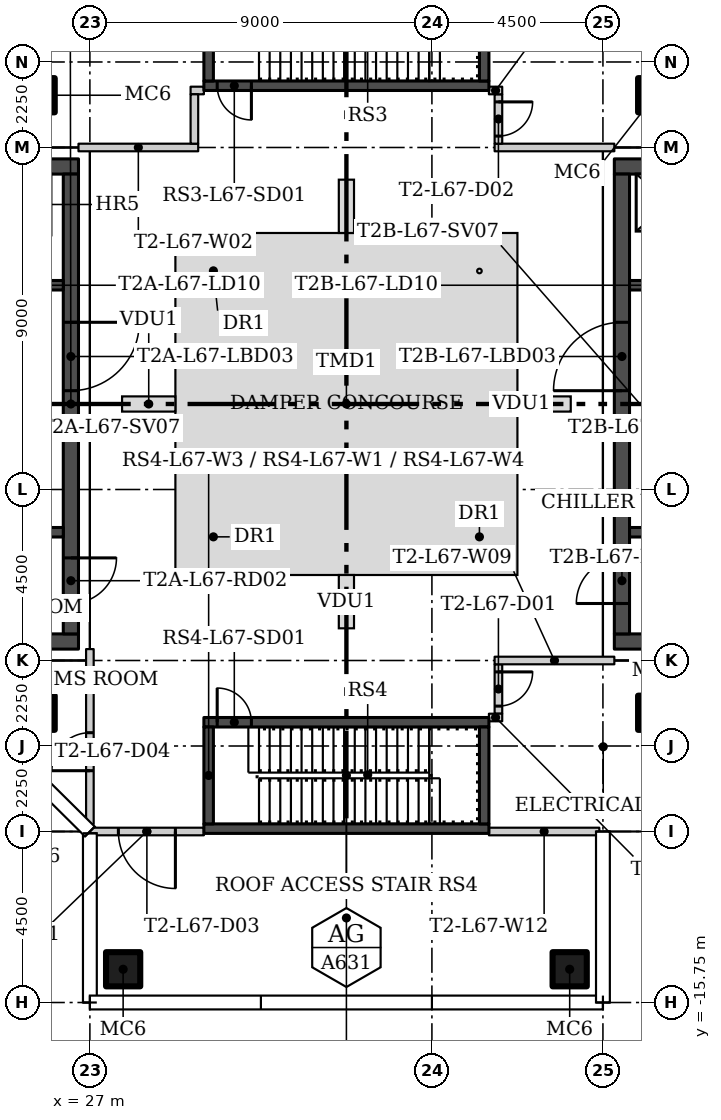
"""IFC4 building model, lengths in metres.
Left out: names, types, materials, properties, quantities, classifications, styles, units other than length and angle.
Written with IfcOpenShell. Run it as: python <this file> out.ifc"""

import sys

from ifc_helpers import new_model, si_unit, direction, frame, frame_2d, origin, origin_2d, place, context, subcontext, project, spatial, rectangle, hollow_rectangle, extrude, element, fill, save


model = new_model("IFC4")
c1 = context("Model", 3, precision=1e-05, world=origin(), true_north=direction((0.0, 1.0)))
c2 = subcontext(c1, "Body", "Model", "MODEL_VIEW")
j1 = project(units=[si_unit("LENGTHUNIT", "METRE"), si_unit("PLANEANGLEUNIT", "RADIAN")], contexts=[c1])
p1 = place(None, origin())
s1 = spatial("IfcSite", under=j1, at=p1, CompositionType="ELEMENT")
p2 = place(p1, origin())
s2 = spatial("IfcBuilding", under=s1, at=p2, CompositionType="ELEMENT")
p3 = place(p2, frame((0.0, 0.0, 278.3)))
s3 = spatial("IfcBuildingStorey", under=s2, at=p3, CompositionType="ELEMENT", Elevation=278.3)
for number, where in (
    (1, (25.625, 8.125, 0.0)),
    (2, (41.875, 8.125, 0.0)),
    (3, (25.625, -8.125, 0.0)),
    (4, (41.875, -8.125, 0.0)),
    (5, (39.625, -14.875, 0.0)),
    (6, (27.875, -14.875, 0.0)),
):
    element("IfcColumn", number, at=place(p3, frame(where)), inside=s3, PredefinedType="COLUMN", context=c2, shape_type="SweptSolid", body=[
        extrude(hollow_rectangle(XDim=0.9, YDim=0.9, WallThickness=0.036, at=origin_2d()), origin(), (0.0, 0.0, 1.0), 5.55),
    ])
for number, where in (
    (7, (37.65, 6.75, 0.0)),
    (8, (26.7, 6.75, 0.0)),
):
    element("IfcWall", number, at=place(p3, frame(where)), inside=s3, PredefinedType="PARTITIONING", context=c2, shape_type="SweptSolid", body=[
        extrude(rectangle(XDim=3.15, YDim=0.2, at=frame_2d((1.575, 0.0))), origin(), (0.0, 0.0, 1.0), 5.55),
    ])
p4 = place(p3, frame((37.75, -6.85, 0.0), z_axis=(0.0, 0.0, 1.0), x_axis=(0.0, -1.0, 0.0)))
e9 = element("IfcWall", 9, at=p4, inside=s3, PredefinedType="PARTITIONING", context=c2, shape_type="SweptSolid", body=[
    extrude(rectangle(XDim=1.3, YDim=0.2, at=frame_2d((0.65, 0.0))), origin(), (0.0, 0.0, 1.0), 5.55),
])
p5 = place(p4, frame((0.2, 0.0, 0.0)))
e10 = element("IfcOpeningElement", 10, at=p5, cuts=e9, PredefinedType="OPENING", context=c2, shape_type="SweptSolid", body=[
    extrude(rectangle(XDim=0.9, YDim=2.4, at=frame_2d((0.45, 1.2))), frame((0.0, 0.11, 0.0), z_axis=(0.0, -1.0, 0.0), x_axis=(1.0, 0.0, 0.0)), (0.0, 0.0, 1.0), 0.22),
])
p6 = place(p3, frame((37.75, 8.15, 0.0), z_axis=(0.0, 0.0, 1.0), x_axis=(0.0, -1.0, 0.0)))
e11 = element("IfcWall", 11, at=p6, inside=s3, PredefinedType="PARTITIONING", context=c2, shape_type="SweptSolid", body=[
    extrude(rectangle(XDim=1.3, YDim=0.2, at=frame_2d((0.65, 0.0))), origin(), (0.0, 0.0, 1.0), 5.55),
])
p7 = place(p6, frame((0.2, 0.0, 0.0)))
e12 = element("IfcOpeningElement", 12, at=p7, cuts=e11, PredefinedType="OPENING", context=c2, shape_type="SweptSolid", body=[
    extrude(rectangle(XDim=0.9, YDim=2.4, at=frame_2d((0.45, 1.2))), frame((0.0, 0.11, 0.0), z_axis=(0.0, -1.0, 0.0), x_axis=(1.0, 0.0, 0.0)), (0.0, 0.0, 1.0), 0.22),
])
for number, where in (
    (13, (37.5, 8.25, 0.0)),
    (14, (29.65, 8.25, 0.0)),
):
    element("IfcWall", number, at=place(p3, frame(where)), inside=s3, PredefinedType="PARTITIONING", context=c2, shape_type="SweptSolid", body=[
        extrude(rectangle(XDim=0.35, YDim=0.2, at=frame_2d((0.175, 0.0))), origin(), (0.0, 0.0, 1.0), 5.55),
    ])
p8 = place(p3, frame((29.75, 6.85, 0.0), z_axis=(0.0, 0.0, 1.0), x_axis=(0.0, 1.0, 0.0)))
e15 = element("IfcWall", 15, at=p8, inside=s3, PredefinedType="PARTITIONING", context=c2, shape_type="SweptSolid", body=[
    extrude(rectangle(XDim=1.3, YDim=0.2, at=frame_2d((0.65, 0.0))), origin(), (0.0, 0.0, 1.0), 5.55),
])
p9 = place(p3, frame((37.85, -8.25, 0.0), z_axis=(0.0, 0.0, 1.0), x_axis=(-1.0, 0.0, 0.0)))
e16 = element("IfcWall", 16, at=p9, inside=s3, PredefinedType="PARTITIONING", context=c2, shape_type="SweptSolid", body=[
    extrude(rectangle(XDim=0.35, YDim=0.2, at=frame_2d((0.175, 0.0))), origin(), (0.0, 0.0, 1.0), 5.55),
])
p10 = place(p3, frame((40.8, -6.75, 0.0), z_axis=(0.0, 0.0, 1.0), x_axis=(-1.0, 0.0, 0.0)))
e17 = element("IfcWall", 17, at=p10, inside=s3, PredefinedType="PARTITIONING", context=c2, shape_type="SweptSolid", body=[
    extrude(rectangle(XDim=3.15, YDim=0.2, at=frame_2d((1.575, 0.0))), origin(), (0.0, 0.0, 1.0), 5.55),
])
p11 = place(p3, frame((30.0, -11.25, 0.0), z_axis=(0.0, 0.0, 1.0), x_axis=(-1.0, 0.0, 0.0)))
e18 = element("IfcWall", 18, at=p11, inside=s3, PredefinedType="PARTITIONING", context=c2, shape_type="SweptSolid", body=[
    extrude(rectangle(XDim=3.005, YDim=0.2, at=frame_2d((1.502, 0.0))), origin(), (0.0, 0.0, 1.0), 5.55),
])
p12 = place(p11, frame((0.75, 0.0, 0.0)))
e19 = element("IfcOpeningElement", 19, at=p12, cuts=e18, PredefinedType="OPENING", context=c2, shape_type="SweptSolid", body=[
    extrude(rectangle(XDim=1.5, YDim=2.4, at=frame_2d((0.75, 1.2))), frame((0.0, 0.11, 0.0), z_axis=(0.0, -1.0, 0.0), x_axis=(1.0, 0.0, 0.0)), (0.0, 0.0, 1.0), 0.22),
])
p13 = place(p3, frame((27.0, -11.055, 0.0), z_axis=(0.0, 0.0, 1.0), x_axis=(0.0, 1.0, 0.0)))
e20 = element("IfcWall", 20, at=p13, inside=s3, PredefinedType="PARTITIONING", context=c2, shape_type="SweptSolid", body=[
    extrude(rectangle(XDim=4.605, YDim=0.2, at=frame_2d((2.302, 0.0))), origin(), (0.0, 0.0, 1.0), 5.55),
])
p14 = place(p13, frame((1.405, 0.0, 0.0)))
e21 = element("IfcOpeningElement", 21, at=p14, cuts=e20, PredefinedType="OPENING", context=c2, shape_type="SweptSolid", body=[
    extrude(rectangle(XDim=1.0, YDim=2.1, at=frame_2d((0.5, 1.05))), frame((0.0, 0.11, 0.0), z_axis=(0.0, -1.0, 0.0), x_axis=(1.0, 0.0, 0.0)), (0.0, 0.0, 1.0), 0.22),
])
p15 = place(p3, frame((37.5, -11.25, 0.0)))
e22 = element("IfcWall", 22, at=p15, inside=s3, PredefinedType="PARTITIONING", context=c2, shape_type="SweptSolid", body=[
    extrude(rectangle(XDim=2.905, YDim=0.2, at=frame_2d((1.453, 0.0))), origin(), (0.0, 0.0, 1.0), 5.55),
])
for number, where in (
    (23, (13.8, -6.25, 0.0)),
    (24, (13.8, 6.25, 0.0)),
):
    element("IfcWall", number, at=place(p3, frame(where)), inside=s3, PredefinedType="SHEAR", context=c2, shape_type="SweptSolid", body=[
        extrude(rectangle(XDim=12.9, YDim=0.4, at=frame_2d((6.45, 0.0))), origin(), (0.0, 0.0, 1.0), 5.55),
    ])
p16 = place(p3, frame((26.5, 6.05, 0.0), z_axis=(0.0, 0.0, 1.0), x_axis=(0.0, -1.0, 0.0)))
e25 = element("IfcWall", 25, at=p16, inside=s3, PredefinedType="SHEAR", context=c2, shape_type="SweptSolid", body=[
    extrude(rectangle(XDim=12.1, YDim=0.4, at=frame_2d((6.05, 0.0))), origin(), (0.0, 0.0, 1.0), 5.55),
])
p17 = place(p16, frame((10.1, 0.0, 0.0)))
e26 = element("IfcOpeningElement", 26, at=p17, cuts=e25, PredefinedType="OPENING", context=c2, shape_type="SweptSolid", body=[
    extrude(rectangle(XDim=1.2, YDim=2.1, at=frame_2d((0.6, 1.05))), frame((0.0, 0.21, 0.0), z_axis=(0.0, -1.0, 0.0), x_axis=(1.0, 0.0, 0.0)), (0.0, 0.0, 1.0), 0.42),
])
p18 = place(p16, frame((3.9, 0.0, 0.0)))
e27 = element("IfcOpeningElement", 27, at=p18, cuts=e25, PredefinedType="OPENING", context=c2, shape_type="SweptSolid", body=[
    extrude(rectangle(XDim=1.8, YDim=2.4, at=frame_2d((0.9, 1.2))), frame((0.0, 0.21, 0.0), z_axis=(0.0, -1.0, 0.0), x_axis=(1.0, 0.0, 0.0)), (0.0, 0.0, 1.0), 0.42),
])
p19 = place(p3, frame((26.3, -3.375, 0.0), z_axis=(0.0, 0.0, 1.0), x_axis=(-1.0, 0.0, 0.0)))
e28 = element("IfcWall", 28, at=p19, inside=s3, PredefinedType="SHEAR", context=c2, shape_type="SweptSolid", body=[
    extrude(rectangle(XDim=12.1, YDim=0.25, at=frame_2d((6.05, 0.0))), origin(), (0.0, 0.0, 1.0), 5.55),
])
p20 = place(p19, frame((10.95, 0.0, 0.0)))
e29 = element("IfcOpeningElement", 29, at=p20, cuts=e28, PredefinedType="OPENING", context=c2, shape_type="SweptSolid", body=[
    extrude(rectangle(XDim=1.1, YDim=2.1, at=frame_2d((0.55, 1.05))), frame((0.0, 0.135, 0.0), z_axis=(0.0, -1.0, 0.0), x_axis=(1.0, 0.0, 0.0)), (0.0, 0.0, 1.0), 0.27),
])
p21 = place(p3, frame((26.3, -0.625, 0.0), z_axis=(0.0, 0.0, 1.0), x_axis=(-1.0, 0.0, 0.0)))
e30 = element("IfcWall", 30, at=p21, inside=s3, PredefinedType="SHEAR", context=c2, shape_type="SweptSolid", body=[
    extrude(rectangle(XDim=12.1, YDim=0.25, at=frame_2d((6.05, 0.0))), origin(), (0.0, 0.0, 1.0), 5.55),
])
p22 = place(p21, frame((8.65, 0.0, 0.0)))
e31 = element("IfcOpeningElement", 31, at=p22, cuts=e30, PredefinedType="OPENING", context=c2, shape_type="SweptSolid", body=[
    extrude(rectangle(XDim=1.2, YDim=2.1, at=frame_2d((0.6, 1.05))), frame((0.0, 0.135, 0.0), z_axis=(0.0, -1.0, 0.0), x_axis=(1.0, 0.0, 0.0)), (0.0, 0.0, 1.0), 0.27),
])
p23 = place(p21, frame((2.15, 0.0, 0.0)))
e32 = element("IfcOpeningElement", 32, at=p23, cuts=e30, PredefinedType="OPENING", context=c2, shape_type="SweptSolid", body=[
    extrude(rectangle(XDim=0.9, YDim=2.1, at=frame_2d((0.45, 1.05))), frame((0.0, 0.135, 0.0), z_axis=(0.0, -1.0, 0.0), x_axis=(1.0, 0.0, 0.0)), (0.0, 0.0, 1.0), 0.27),
])
p24 = place(p21, frame((0.525, 0.0, 0.0)))
e33 = element("IfcOpeningElement", 33, at=p24, cuts=e30, PredefinedType="OPENING", context=c2, shape_type="SweptSolid", body=[
    extrude(rectangle(XDim=0.9, YDim=2.1, at=frame_2d((0.45, 1.05))), frame((0.0, 0.135, 0.0), z_axis=(0.0, -1.0, 0.0), x_axis=(1.0, 0.0, 0.0)), (0.0, 0.0, 1.0), 0.27),
])
p25 = place(p3, frame((14.2, 3.125, 0.0)))
e34 = element("IfcWall", 34, at=p25, inside=s3, PredefinedType="SHEAR", context=c2, shape_type="SweptSolid", body=[
    extrude(rectangle(XDim=12.1, YDim=0.25, at=frame_2d((6.05, 0.0))), origin(), (0.0, 0.0, 1.0), 5.55),
])
p26 = place(p25, frame((6.95, 0.0, 0.0)))
e35 = element("IfcOpeningElement", 35, at=p26, cuts=e34, PredefinedType="OPENING", context=c2, shape_type="SweptSolid", body=[
    extrude(rectangle(XDim=1.1, YDim=2.1, at=frame_2d((0.55, 1.05))), frame((0.0, 0.135, 0.0), z_axis=(0.0, -1.0, 0.0), x_axis=(1.0, 0.0, 0.0)), (0.0, 0.0, 1.0), 0.27),
])
p27 = place(p25, frame((10.075, 0.0, 0.0)))
e36 = element("IfcOpeningElement", 36, at=p27, cuts=e34, PredefinedType="OPENING", context=c2, shape_type="SweptSolid", body=[
    extrude(rectangle(XDim=1.1, YDim=2.1, at=frame_2d((0.55, 1.05))), frame((0.0, 0.135, 0.0), z_axis=(0.0, -1.0, 0.0), x_axis=(1.0, 0.0, 0.0)), (0.0, 0.0, 1.0), 0.27),
])
p28 = place(p25, frame((2.475, 0.0, 0.0)))
e37 = element("IfcOpeningElement", 37, at=p28, cuts=e34, PredefinedType="OPENING", context=c2, shape_type="SweptSolid", body=[
    extrude(rectangle(XDim=0.9, YDim=2.1, at=frame_2d((0.45, 1.05))), frame((0.0, 0.135, 0.0), z_axis=(0.0, -1.0, 0.0), x_axis=(1.0, 0.0, 0.0)), (0.0, 0.0, 1.0), 0.27),
])
for number, where, z_axis, x_axis in (
    (38, (53.7, -6.25, 0.0), (0.0, 0.0, 1.0), (-1.0, 0.0, 0.0)),
    (39, (53.7, 6.25, 0.0), (0.0, 0.0, 1.0), (-1.0, 0.0, 0.0)),
):
    element("IfcWall", number, at=place(p3, frame(where, z_axis=z_axis, x_axis=x_axis)), inside=s3, PredefinedType="SHEAR", context=c2, shape_type="SweptSolid", body=[
        extrude(rectangle(XDim=12.9, YDim=0.4, at=frame_2d((6.45, 0.0))), origin(), (0.0, 0.0, 1.0), 5.55),
    ])
p29 = place(p3, frame((41.0, -6.05, 0.0), z_axis=(0.0, 0.0, 1.0), x_axis=(0.0, 1.0, 0.0)))
e40 = element("IfcWall", 40, at=p29, inside=s3, PredefinedType="SHEAR", context=c2, shape_type="SweptSolid", body=[
    extrude(rectangle(XDim=12.1, YDim=0.4, at=frame_2d((6.05, 0.0))), origin(), (0.0, 0.0, 1.0), 5.55),
])
p30 = place(p29, frame((0.8, 0.0, 0.0)))
e41 = element("IfcOpeningElement", 41, at=p30, cuts=e40, PredefinedType="OPENING", context=c2, shape_type="SweptSolid", body=[
    extrude(rectangle(XDim=1.2, YDim=2.1, at=frame_2d((0.6, 1.05))), frame((0.0, 0.21, 0.0), z_axis=(0.0, -1.0, 0.0), x_axis=(1.0, 0.0, 0.0)), (0.0, 0.0, 1.0), 0.42),
])
p31 = place(p29, frame((6.4, 0.0, 0.0)))
e42 = element("IfcOpeningElement", 42, at=p31, cuts=e40, PredefinedType="OPENING", context=c2, shape_type="SweptSolid", body=[
    extrude(rectangle(XDim=1.8, YDim=2.4, at=frame_2d((0.9, 1.2))), frame((0.0, 0.21, 0.0), z_axis=(0.0, -1.0, 0.0), x_axis=(1.0, 0.0, 0.0)), (0.0, 0.0, 1.0), 0.42),
])
p32 = place(p3, frame((53.3, -3.375, 0.0), z_axis=(0.0, 0.0, 1.0), x_axis=(-1.0, 0.0, 0.0)))
e43 = element("IfcWall", 43, at=p32, inside=s3, PredefinedType="SHEAR", context=c2, shape_type="SweptSolid", body=[
    extrude(rectangle(XDim=12.1, YDim=0.25, at=frame_2d((6.05, 0.0))), origin(), (0.0, 0.0, 1.0), 5.55),
])
p33 = place(p32, frame((0.05, 0.0, 0.0)))
e44 = element("IfcOpeningElement", 44, at=p33, cuts=e43, PredefinedType="OPENING", context=c2, shape_type="SweptSolid", body=[
    extrude(rectangle(XDim=1.1, YDim=2.1, at=frame_2d((0.55, 1.05))), frame((0.0, 0.135, 0.0), z_axis=(0.0, -1.0, 0.0), x_axis=(1.0, 0.0, 0.0)), (0.0, 0.0, 1.0), 0.27),
])
p34 = place(p3, frame((53.3, -0.625, 0.0), z_axis=(0.0, 0.0, 1.0), x_axis=(-1.0, 0.0, 0.0)))
e45 = element("IfcWall", 45, at=p34, inside=s3, PredefinedType="SHEAR", context=c2, shape_type="SweptSolid", body=[
    extrude(rectangle(XDim=12.1, YDim=0.25, at=frame_2d((6.05, 0.0))), origin(), (0.0, 0.0, 1.0), 5.55),
])
p35 = place(p34, frame((2.25, 0.0, 0.0)))
e46 = element("IfcOpeningElement", 46, at=p35, cuts=e45, PredefinedType="OPENING", context=c2, shape_type="SweptSolid", body=[
    extrude(rectangle(XDim=1.2, YDim=2.1, at=frame_2d((0.6, 1.05))), frame((0.0, 0.135, 0.0), z_axis=(0.0, -1.0, 0.0), x_axis=(1.0, 0.0, 0.0)), (0.0, 0.0, 1.0), 0.27),
])
p36 = place(p34, frame((9.2, 0.0, 0.0)))
e47 = element("IfcOpeningElement", 47, at=p36, cuts=e45, PredefinedType="OPENING", context=c2, shape_type="SweptSolid", body=[
    extrude(rectangle(XDim=0.9, YDim=2.1, at=frame_2d((0.45, 1.05))), frame((0.0, 0.135, 0.0), z_axis=(0.0, -1.0, 0.0), x_axis=(1.0, 0.0, 0.0)), (0.0, 0.0, 1.0), 0.27),
])
p37 = place(p34, frame((10.825, 0.0, 0.0)))
e48 = element("IfcOpeningElement", 48, at=p37, cuts=e45, PredefinedType="OPENING", context=c2, shape_type="SweptSolid", body=[
    extrude(rectangle(XDim=0.9, YDim=2.1, at=frame_2d((0.45, 1.05))), frame((0.0, 0.135, 0.0), z_axis=(0.0, -1.0, 0.0), x_axis=(1.0, 0.0, 0.0)), (0.0, 0.0, 1.0), 0.27),
])
p38 = place(p3, frame((41.2, 3.125, 0.0)))
e49 = element("IfcWall", 49, at=p38, inside=s3, PredefinedType="SHEAR", context=c2, shape_type="SweptSolid", body=[
    extrude(rectangle(XDim=4.8, YDim=0.25, at=frame_2d((2.4, 0.0))), origin(), (0.0, 0.0, 1.0), 5.55),
])
p39 = place(p38, frame((0.525, 0.0, 0.0)))
e50 = element("IfcOpeningElement", 50, at=p39, cuts=e49, PredefinedType="OPENING", context=c2, shape_type="SweptSolid", body=[
    extrude(rectangle(XDim=1.1, YDim=2.1, at=frame_2d((0.55, 1.05))), frame((0.0, 0.135, 0.0), z_axis=(0.0, -1.0, 0.0), x_axis=(1.0, 0.0, 0.0)), (0.0, 0.0, 1.0), 0.27),
])
p40 = place(p38, frame((3.025, 0.0, 0.0)))
e51 = element("IfcOpeningElement", 51, at=p40, cuts=e49, PredefinedType="OPENING", context=c2, shape_type="SweptSolid", body=[
    extrude(rectangle(XDim=0.9, YDim=2.1, at=frame_2d((0.45, 1.05))), frame((0.0, 0.135, 0.0), z_axis=(0.0, -1.0, 0.0), x_axis=(1.0, 0.0, 0.0)), (0.0, 0.0, 1.0), 0.27),
])
p41 = place(p3, frame((37.5, 8.375, 0.0), z_axis=(0.0, 0.0, 1.0), x_axis=(-1.0, 0.0, 0.0)))
e52 = element("IfcWall", 52, at=p41, inside=s3, PredefinedType="SHEAR", context=c2, shape_type="SweptSolid", body=[
    extrude(rectangle(XDim=7.5, YDim=0.25, at=frame_2d((3.75, 0.0))), origin(), (0.0, 0.0, 1.0), 5.55),
])
p42 = place(p41, frame((6.25, 0.0, 0.0)))
e53 = element("IfcOpeningElement", 53, at=p42, cuts=e52, PredefinedType="OPENING", context=c2, shape_type="SweptSolid", body=[
    extrude(rectangle(XDim=0.9, YDim=2.1, at=frame_2d((0.45, 1.05))), frame((0.0, 0.135, 0.0), z_axis=(0.0, -1.0, 0.0), x_axis=(1.0, 0.0, 0.0)), (0.0, 0.0, 1.0), 0.27),
])
for number, where, z_axis, x_axis in (
    (54, (30.125, 8.5, 0.0), (0.0, 0.0, 1.0), (0.0, 1.0, 0.0)),
    (55, (37.375, 8.5, 0.0), (0.0, 0.0, 1.0), (0.0, 1.0, 0.0)),
):
    element("IfcWall", number, at=place(p3, frame(where, z_axis=z_axis, x_axis=x_axis)), inside=s3, PredefinedType="SHEAR", context=c2, shape_type="SweptSolid", body=[
        extrude(rectangle(XDim=2.55, YDim=0.25, at=frame_2d((1.275, 0.0))), origin(), (0.0, 0.0, 1.0), 5.55),
    ])
p43 = place(p3, frame((30.0, -8.375, 0.0)))
e56 = element("IfcWall", 56, at=p43, inside=s3, PredefinedType="SHEAR", context=c2, shape_type="SweptSolid", body=[
    extrude(rectangle(XDim=7.5, YDim=0.25, at=frame_2d((3.75, 0.0))), origin(), (0.0, 0.0, 1.0), 5.55),
])
p44 = place(p43, frame((0.35, 0.0, 0.0)))
e57 = element("IfcOpeningElement", 57, at=p44, cuts=e56, PredefinedType="OPENING", context=c2, shape_type="SweptSolid", body=[
    extrude(rectangle(XDim=0.9, YDim=2.1, at=frame_2d((0.45, 1.05))), frame((0.0, 0.135, 0.0), z_axis=(0.0, -1.0, 0.0), x_axis=(1.0, 0.0, 0.0)), (0.0, 0.0, 1.0), 0.27),
])
p45 = place(p3, frame((30.0, -11.175, 0.0)))
e58 = element("IfcWall", 58, at=p45, inside=s3, PredefinedType="SHEAR", context=c2, shape_type="SweptSolid", body=[
    extrude(rectangle(XDim=7.5, YDim=0.25, at=frame_2d((3.75, 0.0))), origin(), (0.0, 0.0, 1.0), 5.55),
])
for number, where, z_axis, x_axis in (
    (59, (30.125, -11.05, 0.0), (0.0, 0.0, 1.0), (0.0, 1.0, 0.0)),
    (60, (37.375, -11.05, 0.0), (0.0, 0.0, 1.0), (0.0, 1.0, 0.0)),
):
    element("IfcWall", number, at=place(p3, frame(where, z_axis=z_axis, x_axis=x_axis)), inside=s3, PredefinedType="SHEAR", context=c2, shape_type="SweptSolid", body=[
        extrude(rectangle(XDim=2.55, YDim=0.25, at=frame_2d((1.275, 0.0))), origin(), (0.0, 0.0, 1.0), 5.55),
    ])
p46 = place(p5, origin())
e61 = element("IfcDoor", 61, at=p46, inside=s3, OperationType="SINGLE_SWING_LEFT", PredefinedType="DOOR", context=c2, shape_type="SweptSolid", body=[
    extrude(rectangle(XDim=0.9, YDim=2.4, at=frame_2d((0.45, 1.2))), frame((0.0, 0.025, 0.0), z_axis=(0.0, -1.0, 0.0), x_axis=(1.0, 0.0, 0.0)), (0.0, 0.0, 1.0), 0.05),
])
fill(e10, e61)
p47 = place(p7, origin())
e62 = element("IfcDoor", 62, at=p47, inside=s3, OperationType="SINGLE_SWING_LEFT", PredefinedType="DOOR", context=c2, shape_type="SweptSolid", body=[
    extrude(rectangle(XDim=0.9, YDim=2.4, at=frame_2d((0.45, 1.2))), frame((0.0, 0.025, 0.0), z_axis=(0.0, -1.0, 0.0), x_axis=(1.0, 0.0, 0.0)), (0.0, 0.0, 1.0), 0.05),
])
fill(e12, e62)
p48 = place(p12, origin())
e63 = element("IfcDoor", 63, at=p48, inside=s3, OperationType="DOUBLE_DOOR_SINGLE_SWING", PredefinedType="DOOR", context=c2, shape_type="SweptSolid", body=[
    extrude(rectangle(XDim=1.5, YDim=2.4, at=frame_2d((0.75, 1.2))), frame((0.0, 0.025, 0.0), z_axis=(0.0, -1.0, 0.0), x_axis=(1.0, 0.0, 0.0)), (0.0, 0.0, 1.0), 0.05),
])
fill(e19, e63)
p49 = place(p14, origin())
e64 = element("IfcDoor", 64, at=p49, inside=s3, OperationType="SINGLE_SWING_RIGHT", PredefinedType="DOOR", context=c2, shape_type="SweptSolid", body=[
    extrude(rectangle(XDim=1.0, YDim=2.1, at=frame_2d((0.5, 1.05))), frame((0.0, 0.025, 0.0), z_axis=(0.0, -1.0, 0.0), x_axis=(1.0, 0.0, 0.0)), (0.0, 0.0, 1.0), 0.05),
])
fill(e21, e64)
p50 = place(p17, origin())
e65 = element("IfcDoor", 65, at=p50, inside=s3, OperationType="SINGLE_SWING_RIGHT", PredefinedType="DOOR", context=c2, shape_type="SweptSolid", body=[
    extrude(rectangle(XDim=1.2, YDim=2.1, at=frame_2d((0.6, 1.05))), frame((0.0, 0.025, 0.0), z_axis=(0.0, -1.0, 0.0), x_axis=(1.0, 0.0, 0.0)), (0.0, 0.0, 1.0), 0.05),
])
fill(e26, e65)
p51 = place(p18, origin())
e66 = element("IfcDoor", 66, at=p51, inside=s3, OperationType="DOUBLE_DOOR_SINGLE_SWING", PredefinedType="DOOR", context=c2, shape_type="SweptSolid", body=[
    extrude(rectangle(XDim=1.8, YDim=2.4, at=frame_2d((0.9, 1.2))), frame((0.0, 0.025, 0.0), z_axis=(0.0, -1.0, 0.0), x_axis=(1.0, 0.0, 0.0)), (0.0, 0.0, 1.0), 0.05),
])
fill(e27, e66)
p52 = place(p30, origin())
e67 = element("IfcDoor", 67, at=p52, inside=s3, OperationType="SINGLE_SWING_LEFT", PredefinedType="DOOR", context=c2, shape_type="SweptSolid", body=[
    extrude(rectangle(XDim=1.2, YDim=2.1, at=frame_2d((0.6, 1.05))), frame((0.0, 0.025, 0.0), z_axis=(0.0, -1.0, 0.0), x_axis=(1.0, 0.0, 0.0)), (0.0, 0.0, 1.0), 0.05),
])
fill(e41, e67)
p53 = place(p31, origin())
e68 = element("IfcDoor", 68, at=p53, inside=s3, OperationType="DOUBLE_DOOR_SINGLE_SWING", PredefinedType="DOOR", context=c2, shape_type="SweptSolid", body=[
    extrude(rectangle(XDim=1.8, YDim=2.4, at=frame_2d((0.9, 1.2))), frame((0.0, 0.025, 0.0), z_axis=(0.0, -1.0, 0.0), x_axis=(1.0, 0.0, 0.0)), (0.0, 0.0, 1.0), 0.05),
])
fill(e42, e68)
p54 = place(p42, origin())
e69 = element("IfcDoor", 69, at=p54, inside=s3, OperationType="SINGLE_SWING_RIGHT", PredefinedType="DOOR", context=c2, shape_type="SweptSolid", body=[
    extrude(rectangle(XDim=0.9, YDim=2.1, at=frame_2d((0.45, 1.05))), frame((0.0, 0.025, 0.0), z_axis=(0.0, -1.0, 0.0), x_axis=(1.0, 0.0, 0.0)), (0.0, 0.0, 1.0), 0.05),
])
fill(e53, e69)
p55 = place(p44, origin())
e70 = element("IfcDoor", 70, at=p55, inside=s3, OperationType="SINGLE_SWING_LEFT", PredefinedType="DOOR", context=c2, shape_type="SweptSolid", body=[
    extrude(rectangle(XDim=0.9, YDim=2.1, at=frame_2d((0.45, 1.05))), frame((0.0, 0.025, 0.0), z_axis=(0.0, -1.0, 0.0), x_axis=(1.0, 0.0, 0.0)), (0.0, 0.0, 1.0), 0.05),
])
fill(e57, e70)
save(model, sys.argv[1])
